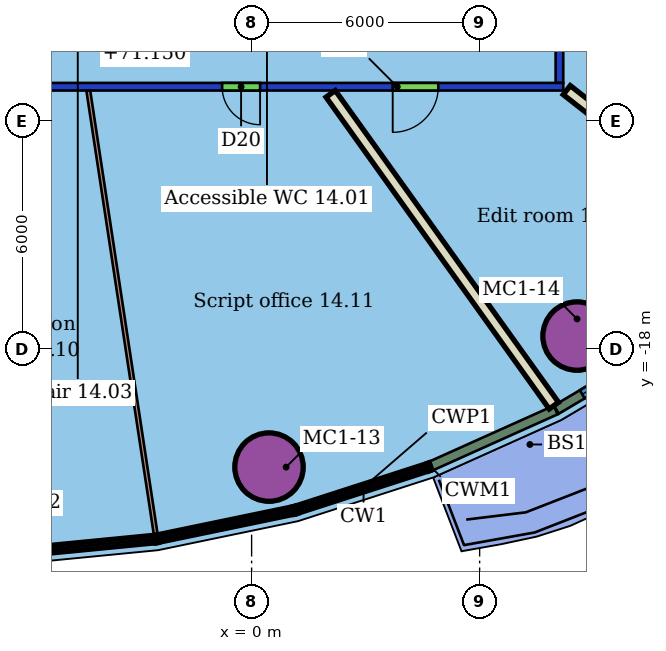
"""IFC4 building model, lengths in metres.
Left out: names, types, materials, properties, quantities, classifications, styles, units other than length and angle.
Written with IfcOpenShell. Run it as: python <this file> out.ifc"""

import sys

from ifc_helpers import new_model, si_unit, direction, frame, frame_2d, origin, origin_2d, place, context, subcontext, project, spatial, rectangle, hollow_circle, extrude, element, fill, save


model = new_model("IFC4")
c1 = context("Model", 3, precision=1e-05, world=origin(), true_north=direction((0.0, 1.0)))
c2 = subcontext(c1, "Body", "Model", "MODEL_VIEW")
j1 = project(units=[si_unit("LENGTHUNIT", "METRE"), si_unit("PLANEANGLEUNIT", "RADIAN")], contexts=[c1])
p1 = place(None, origin())
s1 = spatial("IfcSite", under=j1, at=p1, CompositionType="ELEMENT")
p2 = place(p1, origin())
s2 = spatial("IfcBuilding", under=s1, at=p2, CompositionType="ELEMENT")
p3 = place(p2, frame((0.0, 0.0, 69.3)))
s3 = spatial("IfcBuildingStorey", under=s2, at=p3, CompositionType="ELEMENT", Elevation=69.3)
for number, where, z_axis, x_axis in (
    (1, (0.458, -21.108, 0.0), (0.0, 0.0, 1.0), (1.0, 0.0, 0.0)),
    (2, (8.563, -17.66, 0.0), (0.0, 0.0, 1.0), (1.0, 0.0, 0.0)),
):
    element("IfcColumn", number, at=place(p3, frame(where, z_axis=z_axis, x_axis=x_axis)), inside=s3, PredefinedType="COLUMN", context=c2, shape_type="SweptSolid", body=[
        extrude(hollow_circle(Radius=0.9, WallThickness=0.06, at=origin_2d()), origin(), (0.0, 0.0, 1.0), 3.55),
    ])
p4 = place(p3, frame((8.2, -11.1, 0.0), z_axis=(0.0, 0.0, 1.0), x_axis=(-1.0, 0.0, 0.0)))
e3 = element("IfcWall", 3, at=p4, inside=s3, PredefinedType="PARTITIONING", context=c2, shape_type="SweptSolid", body=[
    extrude(rectangle(XDim=28.4, YDim=0.2, at=frame_2d((14.2, 0.0))), origin(), (0.0, 0.0, 1.0), 2.85),
])
p5 = place(p4, frame((23.811, 0.0, 0.0)))
e4 = element("IfcOpeningElement", 4, at=p5, cuts=e3, PredefinedType="OPENING", context=c2, shape_type="SweptSolid", body=[
    extrude(rectangle(XDim=0.9, YDim=2.1, at=frame_2d((0.45, 1.05))), frame((0.0, 0.11, 0.0), z_axis=(0.0, -1.0, 0.0), x_axis=(1.0, 0.0, 0.0)), (0.0, 0.0, 1.0), 0.22),
])
p6 = place(p4, frame((19.218, 0.0, 0.0)))
e5 = element("IfcOpeningElement", 5, at=p6, cuts=e3, PredefinedType="OPENING", context=c2, shape_type="SweptSolid", body=[
    extrude(rectangle(XDim=1.1, YDim=2.1, at=frame_2d((0.55, 1.05))), frame((0.0, 0.11, 0.0), z_axis=(0.0, -1.0, 0.0), x_axis=(1.0, 0.0, 0.0)), (0.0, 0.0, 1.0), 0.22),
])
p7 = place(p4, frame((14.111, 0.0, 0.0)))
e6 = element("IfcOpeningElement", 6, at=p7, cuts=e3, PredefinedType="OPENING", context=c2, shape_type="SweptSolid", body=[
    extrude(rectangle(XDim=1.0, YDim=2.1, at=frame_2d((0.5, 1.05))), frame((0.0, 0.11, 0.0), z_axis=(0.0, -1.0, 0.0), x_axis=(1.0, 0.0, 0.0)), (0.0, 0.0, 1.0), 0.22),
])
p8 = place(p4, frame((7.977, 0.0, 0.0)))
e7 = element("IfcOpeningElement", 7, at=p8, cuts=e3, PredefinedType="OPENING", context=c2, shape_type="SweptSolid", body=[
    extrude(rectangle(XDim=1.0, YDim=2.1, at=frame_2d((0.5, 1.05))), frame((0.0, 0.11, 0.0), z_axis=(0.0, -1.0, 0.0), x_axis=(1.0, 0.0, 0.0)), (0.0, 0.0, 1.0), 0.22),
])
p9 = place(p4, frame((3.287, 0.0, 0.0)))
e8 = element("IfcOpeningElement", 8, at=p9, cuts=e3, PredefinedType="OPENING", context=c2, shape_type="SweptSolid", body=[
    extrude(rectangle(XDim=1.2, YDim=2.1, at=frame_2d((0.6, 1.05))), frame((0.0, 0.11, 0.0), z_axis=(0.0, -1.0, 0.0), x_axis=(1.0, 0.0, 0.0)), (0.0, 0.0, 1.0), 0.22),
])
p10 = place(p3, frame((8.1, 11.0, 0.0), z_axis=(0.0, 0.0, 1.0), x_axis=(0.0, -1.0, 0.0)))
e9 = element("IfcWall", 9, at=p10, inside=s3, PredefinedType="PARTITIONING", context=c2, shape_type="SweptSolid", body=[
    extrude(rectangle(XDim=22.0, YDim=0.2, at=frame_2d((11.0, 0.0))), origin(), (0.0, 0.0, 1.0), 2.85),
])
p11 = place(p10, frame((13.556, 0.0, 0.0)))
e10 = element("IfcOpeningElement", 10, at=p11, cuts=e9, PredefinedType="OPENING", context=c2, shape_type="SweptSolid", body=[
    extrude(rectangle(XDim=1.8, YDim=2.1, at=frame_2d((0.9, 1.05))), frame((0.0, 0.11, 0.0), z_axis=(0.0, -1.0, 0.0), x_axis=(1.0, 0.0, 0.0)), (0.0, 0.0, 1.0), 0.22),
])
p12 = place(p10, frame((6.879, 0.0, 0.0)))
e11 = element("IfcOpeningElement", 11, at=p12, cuts=e9, PredefinedType="OPENING", context=c2, shape_type="SweptSolid", body=[
    extrude(rectangle(XDim=0.9, YDim=2.1, at=frame_2d((0.45, 1.05))), frame((0.0, 0.11, 0.0), z_axis=(0.0, -1.0, 0.0), x_axis=(1.0, 0.0, 0.0)), (0.0, 0.0, 1.0), 0.22),
])
p13 = place(p3, frame((-2.524, -22.874, 0.0), z_axis=(0.0, 0.0, 1.0), x_axis=(-0.150244181416, 0.988648919461, 0.0)))
e12 = element("IfcWall", 12, at=p13, inside=s3, PredefinedType="PARTITIONING", context=c2, shape_type="SweptSolid", body=[
    extrude(rectangle(XDim=11.801, YDim=0.1, at=frame_2d((5.9, 0.0))), origin(), (0.0, 0.0, 1.0), 3.55),
])
p14 = place(p3, frame((7.953, -19.491, 0.0), z_axis=(0.0, 0.0, 1.0), x_axis=(-0.582107718731, 0.813111679779, 0.0)))
e13 = element("IfcWall", 13, at=p14, inside=s3, PredefinedType="PARTITIONING", context=c2, shape_type="SweptSolid", body=[
    extrude(rectangle(XDim=10.089, YDim=0.3, at=frame_2d((5.044, 0.0))), origin(), (0.0, 0.0, 1.0), 3.55),
])
p15 = place(p3, frame((13.836, -15.529, 0.0), z_axis=(0.0, 0.0, 1.0), x_axis=(-0.787406195981, 0.616434491678, 0.0)))
e14 = element("IfcWall", 14, at=p15, inside=s3, PredefinedType="PARTITIONING", context=c2, shape_type="SweptSolid", body=[
    extrude(rectangle(XDim=7.04, YDim=0.3, at=frame_2d((3.52, 0.0))), origin(), (0.0, 0.0, 1.0), 3.55),
])
p16 = place(p3, frame((4.719, -21.08, 0.0), z_axis=(0.0, 0.0, 1.0), x_axis=(0.912212078045, 0.409718347977, 0.0)))
e15 = element("IfcWall", 15, at=p16, inside=s3, PredefinedType="SOLIDWALL", context=c2, shape_type="SweptSolid", body=[
    extrude(rectangle(XDim=3.597, YDim=0.25, at=frame_2d((1.799, 0.0))), origin(), (0.0, 0.0, 1.0), 3.15),
])
p17 = place(p3, frame((8.02, -19.596, 0.0), z_axis=(0.0, 0.0, 1.0), x_axis=(0.860342460641, 0.509716441188, 0.0)))
e16 = element("IfcWall", 16, at=p17, inside=s3, PredefinedType="SOLIDWALL", context=c2, shape_type="SweptSolid", body=[
    extrude(rectangle(XDim=3.582, YDim=0.25, at=frame_2d((1.791, 0.0))), origin(), (0.0, 0.0, 1.0), 3.15),
])
p18 = place(p17, frame((0.791, 0.0, 0.8)))
e17 = element("IfcOpeningElement", 17, at=p18, cuts=e16, PredefinedType="OPENING", context=c2, shape_type="SweptSolid", body=[
    extrude(rectangle(XDim=2.0, YDim=2.2, at=frame_2d((1.0, 1.1))), frame((0.0, 0.135, 0.0), z_axis=(0.0, -1.0, 0.0), x_axis=(1.0, 0.0, 0.0)), (0.0, 0.0, 1.0), 0.27),
])
p19 = place(p8, origin())
e18 = element("IfcDoor", 18, at=p19, inside=s3, OperationType="SINGLE_SWING_LEFT", PredefinedType="DOOR", context=c2, shape_type="SweptSolid", body=[
    extrude(rectangle(XDim=1.0, YDim=2.1, at=frame_2d((0.5, 1.05))), frame((0.0, 0.025, 0.0), z_axis=(0.0, -1.0, 0.0), x_axis=(1.0, 0.0, 0.0)), (0.0, 0.0, 1.0), 0.05),
])
fill(e7, e18)
p20 = place(p9, origin())
e19 = element("IfcDoor", 19, at=p20, inside=s3, OperationType="SINGLE_SWING_RIGHT", PredefinedType="DOOR", context=c2, shape_type="SweptSolid", body=[
    extrude(rectangle(XDim=1.2, YDim=2.1, at=frame_2d((0.6, 1.05))), frame((0.0, 0.025, 0.0), z_axis=(0.0, -1.0, 0.0), x_axis=(1.0, 0.0, 0.0)), (0.0, 0.0, 1.0), 0.05),
])
fill(e8, e19)
p21 = place(p18, origin())
e20 = element("IfcWindow", 20, at=p21, inside=s3, PartitioningType="SINGLE_PANEL", PredefinedType="WINDOW", context=c2, shape_type="SweptSolid", body=[
    extrude(rectangle(XDim=2.0, YDim=2.2, at=frame_2d((1.0, 1.1))), frame((0.0, 0.03, 0.0), z_axis=(0.0, -1.0, 0.0), x_axis=(1.0, 0.0, 0.0)), (0.0, 0.0, 1.0), 0.06),
])
fill(e17, e20)
save(model, sys.argv[1])
